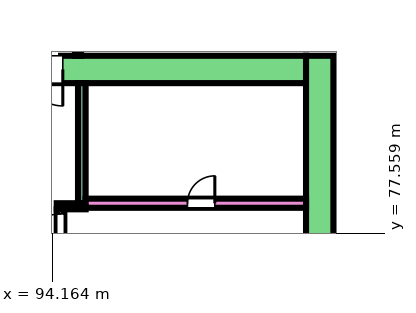
"""IFC4 building model, lengths in metres.
Left out: names, types, materials, properties, quantities, classifications, styles, units other than length and angle.
Written with IfcOpenShell. Run it as: python <this file> out.ifc"""

import sys

from ifc_helpers import new_model, si_unit, direction, frame, frame_2d, origin, place, context, subcontext, project, spatial, rectangle, extrude, element, fill, save


model = new_model("IFC4")
c1 = context("Model", 3, precision=1e-05, world=origin(), true_north=direction((0.0, 1.0)))
c2 = subcontext(c1, "Body", "Model", "MODEL_VIEW")
j1 = project(units=[si_unit("LENGTHUNIT", "METRE"), si_unit("PLANEANGLEUNIT", "RADIAN")], contexts=[c1])
p1 = place(None, origin())
s1 = spatial("IfcSite", under=j1, at=p1, CompositionType="ELEMENT")
p2 = place(p1, origin())
s2 = spatial("IfcBuilding", under=s1, at=p2, CompositionType="ELEMENT")
p3 = place(p2, origin())
s3 = spatial("IfcBuildingStorey", under=s2, at=p3, CompositionType="ELEMENT", Elevation=0.0)
p4 = place(p3, frame((87.9, 82.95, 0.0), z_axis=(0.0, 0.0, 1.0), x_axis=(1.0, 0.0, 0.0)))
e1 = element("IfcWall", 1, at=p4, inside=s3, PredefinedType="SHEAR", context=c2, shape_type="SweptSolid", body=[
    extrude(rectangle(XDim=14.6, YDim=0.9, at=frame_2d((7.3, 0.0))), origin(), (0.0, 0.0, 1.0), 6.55),
])
p5 = place(p4, frame((4.2, 0.0, 0.0)))
e2 = element("IfcOpeningElement", 2, at=p5, cuts=e1, PredefinedType="OPENING", context=c2, shape_type="SweptSolid", body=[
    extrude(rectangle(XDim=2.4, YDim=2.4, at=frame_2d((1.2, 1.2))), frame((0.0, 0.46, 0.0), z_axis=(0.0, -1.0, 0.0), x_axis=(1.0, 0.0, 0.0)), (0.0, 0.0, 1.0), 0.92),
])
p6 = place(p3, frame((102.95, 66.6, 0.0), z_axis=(0.0, 0.0, 1.0), x_axis=(0.0, 1.0, 0.0)))
e3 = element("IfcWall", 3, at=p6, inside=s3, PredefinedType="SHEAR", context=c2, shape_type="SweptSolid", body=[
    extrude(rectangle(XDim=16.8, YDim=0.9, at=frame_2d((8.4, 0.0))), origin(), (0.0, 0.0, 1.0), 6.55),
])
p7 = place(p3, frame((95.125, 78.55, 0.0), z_axis=(0.0, 0.0, 1.0), x_axis=(0.0, 1.0, 0.0)))
e4 = element("IfcWall", 4, at=p7, inside=s3, PredefinedType="SHEAR", context=c2, shape_type="SweptSolid", body=[
    extrude(rectangle(XDim=3.95, YDim=0.25, at=frame_2d((1.975, 0.0))), origin(), (0.0, 0.0, 1.0), 6.55),
])
p8 = place(p3, frame((94.3, 78.45, 0.0), z_axis=(0.0, 0.0, 1.0), x_axis=(1.0, 0.0, 0.0)))
e5 = element("IfcWall", 5, at=p8, inside=s3, PredefinedType="SHEAR", context=c2, shape_type="SweptSolid", body=[
    extrude(rectangle(XDim=0.95, YDim=0.2, at=frame_2d((0.475, 0.0))), origin(), (0.0, 0.0, 1.0), 6.55),
])
p9 = place(p3, frame((94.425, 76.85, 0.0), z_axis=(0.0, 0.0, 1.0), x_axis=(0.0, 1.0, 0.0)))
e6 = element("IfcWall", 6, at=p9, inside=s3, PredefinedType="SHEAR", context=c2, shape_type="SweptSolid", body=[
    extrude(rectangle(XDim=1.5, YDim=0.25, at=frame_2d((0.75, 0.0))), origin(), (0.0, 0.0, 1.0), 6.55),
])
p10 = place(p9, frame((0.15, 0.0, 0.0)))
e7 = element("IfcOpeningElement", 7, at=p10, cuts=e6, PredefinedType="OPENING", context=c2, shape_type="SweptSolid", body=[
    extrude(rectangle(XDim=1.2, YDim=2.1, at=frame_2d((0.6, 1.05))), frame((0.0, 0.135, 0.0), z_axis=(0.0, -1.0, 0.0), x_axis=(1.0, 0.0, 0.0)), (0.0, 0.0, 1.0), 0.27),
])
p11 = place(p3, frame((95.25, 78.55, 0.0), z_axis=(0.0, 0.0, 1.0), x_axis=(1.0, 0.0, 0.0)))
e8 = element("IfcWall", 8, at=p11, inside=s3, PredefinedType="SHEAR", context=c2, shape_type="SweptSolid", body=[
    extrude(rectangle(XDim=7.25, YDim=0.3, at=frame_2d((3.625, 0.0))), origin(), (0.0, 0.0, 1.0), 6.55),
])
p12 = place(p11, frame((3.35, 0.0, 0.0)))
e9 = element("IfcOpeningElement", 9, at=p12, cuts=e8, PredefinedType="OPENING", context=c2, shape_type="SweptSolid", body=[
    extrude(rectangle(XDim=0.9, YDim=2.1, at=frame_2d((0.45, 1.05))), frame((0.0, 0.16, 0.0), z_axis=(0.0, -1.0, 0.0), x_axis=(1.0, 0.0, 0.0)), (0.0, 0.0, 1.0), 0.32),
])
p13 = place(p3, frame((95.0, 83.401, 0.0), z_axis=(0.0, 0.0, 1.0), x_axis=(0.0, 1.0, 0.0)))
e10 = element("IfcWall", 10, at=p13, inside=s3, PredefinedType="PARTITIONING", context=c2, shape_type="SweptSolid", body=[
    extrude(rectangle(XDim=1.499, YDim=0.2, at=frame_2d((0.75, 0.0))), origin(), (0.0, 0.0, 1.0), 6.55),
])
p14 = place(p10, origin())
e11 = element("IfcDoor", 11, at=p14, inside=s3, OperationType="SINGLE_SWING_LEFT", PredefinedType="DOOR", context=c2, shape_type="SweptSolid", body=[
    extrude(rectangle(XDim=1.2, YDim=2.1, at=frame_2d((0.6, 1.05))), frame((0.0, 0.025, 0.0), z_axis=(0.0, -1.0, 0.0), x_axis=(1.0, 0.0, 0.0)), (0.0, 0.0, 1.0), 0.05),
])
fill(e7, e11)
p15 = place(p12, origin())
e12 = element("IfcDoor", 12, at=p15, inside=s3, OperationType="SINGLE_SWING_RIGHT", PredefinedType="DOOR", context=c2, shape_type="SweptSolid", body=[
    extrude(rectangle(XDim=0.9, YDim=2.1, at=frame_2d((0.45, 1.05))), frame((0.0, 0.025, 0.0), z_axis=(0.0, -1.0, 0.0), x_axis=(1.0, 0.0, 0.0)), (0.0, 0.0, 1.0), 0.05),
])
fill(e9, e12)
p16 = place(p5, frame((2.4, 0.0, 0.0), z_axis=(0.0, 0.0, 1.0), x_axis=(-1.0, 0.0, 0.0)))
e13 = element("IfcDoor", 13, at=p16, inside=s3, OperationType="DOUBLE_DOOR_SINGLE_SWING", PredefinedType="DOOR", context=c2, shape_type="SweptSolid", body=[
    extrude(rectangle(XDim=2.4, YDim=2.4, at=frame_2d((1.2, 1.2))), frame((0.0, 0.025, 0.0), z_axis=(0.0, -1.0, 0.0), x_axis=(1.0, 0.0, 0.0)), (0.0, 0.0, 1.0), 0.05),
])
fill(e2, e13)
save(model, sys.argv[1])
